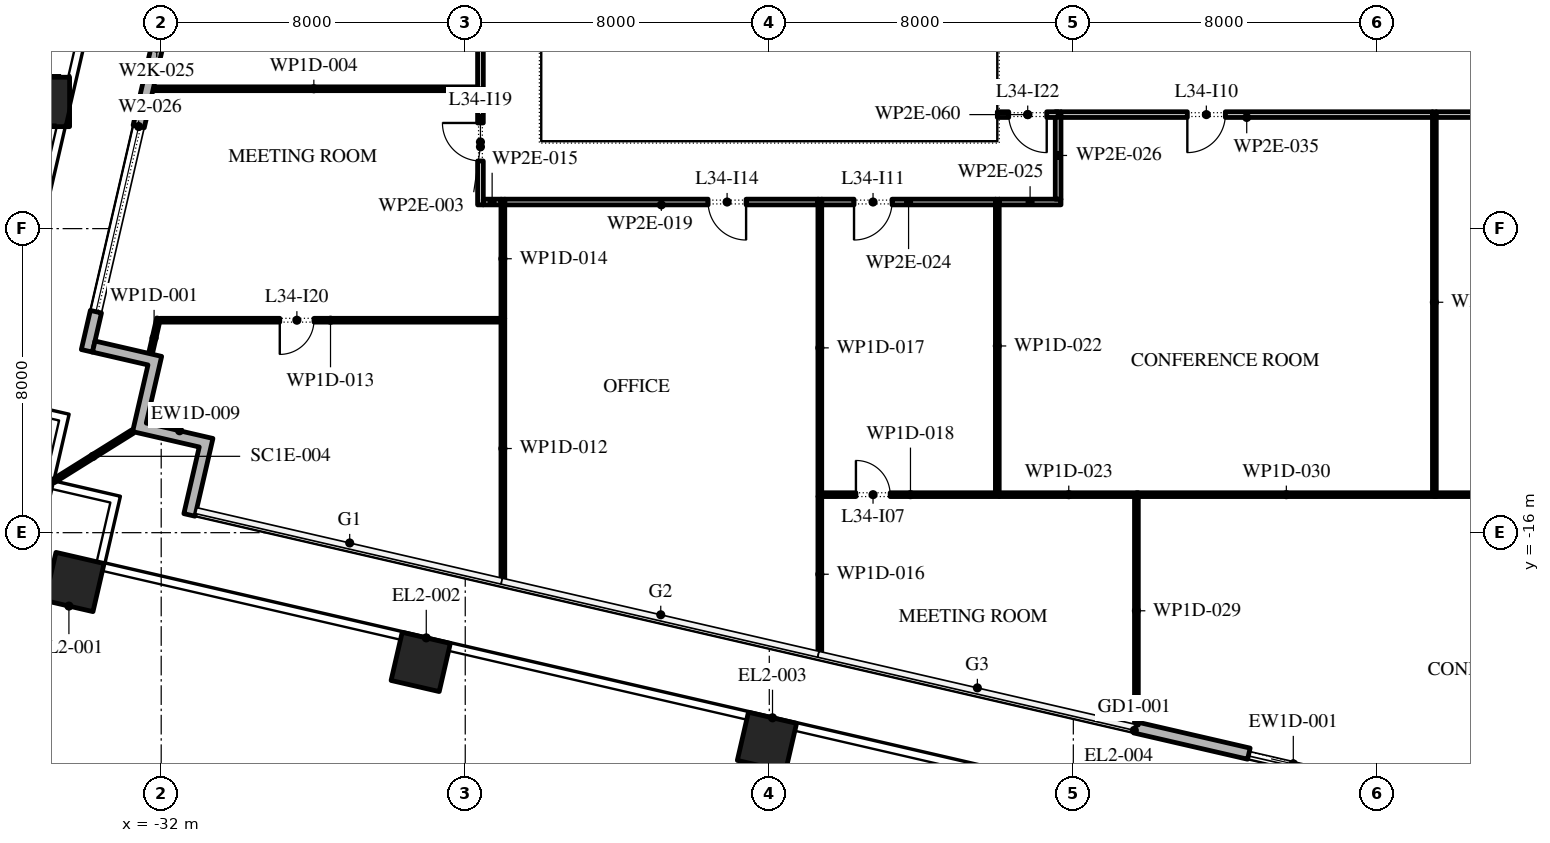
"""IFC4 building model, lengths in metres.
Left out: names, types, materials, properties, quantities, classifications, styles, units other than length and angle.
Written with IfcOpenShell. Run it as: python <this file> out.ifc"""

import sys

from ifc_helpers import new_model, si_unit, direction, frame, frame_2d, origin, origin_2d, place, context, subcontext, project, spatial, polyline, rectangle, outline, extrude, element, fill, save


model = new_model("IFC4")
c1 = context("Model", 3, precision=1e-05, world=origin(), true_north=direction((0.0, 1.0)))
c2 = subcontext(c1, "Body", "Model", "MODEL_VIEW")
j1 = project(units=[si_unit("LENGTHUNIT", "METRE"), si_unit("PLANEANGLEUNIT", "RADIAN")], contexts=[c1])
p1 = place(None, origin())
s1 = spatial("IfcSite", under=j1, at=p1, CompositionType="ELEMENT")
p2 = place(p1, origin())
s2 = spatial("IfcBuilding", under=s1, at=p2, CompositionType="ELEMENT")
p3 = place(p2, frame((0.0, 0.0, 156.0)))
s3 = spatial("IfcBuildingStorey", under=s2, at=p3, CompositionType="ELEMENT", Elevation=156.0)
for number, where, z_axis, x_axis in (
    (1, (-34.282, -17.298, 0.0), (0.0, 0.0, 1.0), (0.974, -0.225, 0.0)),
    (2, (-25.172, -19.402, 0.0), (0.0, 0.0, 1.0), (0.974, -0.225, 0.0)),
    (3, (-16.061, -21.505, 0.0), (0.0, 0.0, 1.0), (0.974, -0.225, 0.0)),
):
    element("IfcColumn", number, at=place(p3, frame(where, z_axis=z_axis, x_axis=x_axis)), inside=s3, PredefinedType="COLUMN", context=c2, shape_type="SweptSolid", body=[
        extrude(rectangle(XDim=1.3, YDim=1.3, at=origin_2d()), origin(), (0.0, 0.0, 1.0), 4.2),
    ])
p4 = place(p3, frame((-35.061, -4.667, 0.0), z_axis=(0.002906226325, 0.012613022249, 0.99991622925), x_axis=(-0.974466825284, 0.224531526563, 0.0)))
e4 = element("IfcColumn", 4, at=p4, inside=s3, PredefinedType="COLUMN", context=c2, shape_type="SweptSolid", body=[
    extrude(rectangle(XDim=1.3, YDim=1.3, at=origin_2d()), origin(), (0.0, 0.0, 1.0), 4.2),
])
p5 = place(p3, frame((-35.631, -15.139, 0.0), z_axis=(0.0, 0.0, 1.0), x_axis=(0.974370064785, -0.224951054344, 0.0)))
e5 = element("IfcColumn", 5, at=p5, inside=s3, PredefinedType="COLUMN", context=c2, shape_type="SweptSolid", body=[
    extrude(rectangle(XDim=1.3, YDim=1.3, at=origin_2d()), origin(), (0.0, 0.0, 1.0), 4.2),
])
p6 = place(p3, frame((-6.377, -21.123, 0.0), z_axis=(0.0, 0.0, 1.0), x_axis=(0.974370979495, -0.224947092265, 0.0)))
e6 = element("IfcWall", 6, at=p6, inside=s3, PredefinedType="STANDARD", context=c2, shape_type="SweptSolid", body=[
    extrude(rectangle(XDim=8.55, YDim=0.3, at=frame_2d((4.275, 0.0))), origin(), (0.0, 0.0, 1.0), 3.9),
])
p7 = place(p6, frame((3.075, 0.0, 0.0)))
e7 = element("IfcOpeningElement", 7, at=p7, cuts=e6, PredefinedType="OPENING", context=c2, shape_type="SweptSolid", body=[
    extrude(rectangle(XDim=2.4, YDim=3.5, at=frame_2d((1.2, 1.75))), frame((0.0, 0.16, 0.0), z_axis=(0.0, -1.0, 0.0), x_axis=(1.0, 0.0, 0.0)), (0.0, 0.0, 1.0), 0.32),
])
p8 = place(p3, origin())
e8 = element("IfcWall", 8, at=p8, inside=s3, PredefinedType="STANDARD", context=c2, shape_type="SweptSolid", body=[
    extrude(outline(polyline([(-32.393, -13.116), (-30.639, -13.521), (-31.111, -15.567), (-31.404, -15.5), (-30.999, -13.746), (-32.753, -13.341), (-32.348, -11.587), (-33.809, -11.25), (-33.742, -10.957), (-31.988, -11.362), (-32.393, -13.116)])), origin(), (0.0, 0.0, 1.0), 3.9),
])
p9 = place(p3, frame((-32.753, -13.341, -0.05), z_axis=(0.0, 0.0, 1.0), x_axis=(-0.848059759764, -0.529900598103, 0.0)))
e9 = element("IfcWall", 9, at=p9, inside=s3, PredefinedType="STANDARD", context=c2, shape_type="SweptSolid", body=[
    extrude(rectangle(XDim=2.455, YDim=0.1, at=frame_2d((1.228, 0.0))), origin(), (0.0, 0.0, 1.0), 3.95),
])
p10 = place(p3, frame((-32.069, -10.361, 0.0), z_axis=(0.0, 0.0, 1.0), x_axis=(-0.222987762652, -0.974821243976, 0.0)))
e10 = element("IfcWall", 10, at=p10, inside=s3, PredefinedType="PARTITIONING", context=c2, shape_type="SweptSolid", body=[
    extrude(rectangle(XDim=1.058, YDim=0.1, at=frame_2d((0.529, 0.0))), origin(), (0.0, 0.0, 1.0), 3.9),
])
p11 = place(p3, frame((-23.6, -7.375, 0.0), z_axis=(0.0, 0.0, 1.0), x_axis=(0.0, 1.0, 0.0)))
e11 = element("IfcWall", 11, at=p11, inside=s3, PredefinedType="PARTITIONING", context=c2, shape_type="SweptSolid", body=[
    extrude(rectangle(XDim=3.055, YDim=0.15, at=frame_2d((1.527, 0.0))), origin(), (0.0, 0.0, 1.0), 3.9),
])
p12 = place(p11, frame((1.155, 0.0, 0.0)))
e12 = element("IfcOpeningElement", 12, at=p12, cuts=e11, PredefinedType="OPENING", context=c2, shape_type="SweptSolid", body=[
    extrude(rectangle(XDim=1.0, YDim=2.1, at=frame_2d((0.5, 1.05))), frame((0.0, 0.085, 0.0), z_axis=(0.0, -1.0, 0.0), x_axis=(1.0, 0.0, 0.0)), (0.0, 0.0, 1.0), 0.17),
])
p13 = place(p3, frame((-23.675, -4.32, 0.0), z_axis=(0.0, 0.0, 1.0), x_axis=(-1.0, 0.0, 0.0)))
e13 = element("IfcWall", 13, at=p13, inside=s3, PredefinedType="PARTITIONING", context=c2, shape_type="SweptSolid", body=[
    extrude(rectangle(XDim=8.617, YDim=0.1, at=frame_2d((4.309, 0.0))), origin(), (0.0, 0.0, 1.0), 3.9),
])
p14 = place(p3, frame((-23.6, -4.32, 0.0), z_axis=(0.0, 0.0, 1.0), x_axis=(0.0, 1.0, 0.0)))
e14 = element("IfcWall", 14, at=p14, inside=s3, PredefinedType="PARTITIONING", context=c2, shape_type="SweptSolid", body=[
    extrude(rectangle(XDim=7.82, YDim=0.15, at=frame_2d((3.91, 0.0))), origin(), (0.0, 0.0, 1.0), 3.9),
])
p15 = place(p14, frame((3.37, 0.0, 0.0)))
e15 = element("IfcOpeningElement", 15, at=p15, cuts=e14, PredefinedType="OPENING", context=c2, shape_type="SweptSolid", body=[
    extrude(rectangle(XDim=1.0, YDim=2.1, at=frame_2d((0.5, 1.05))), frame((0.0, 0.085, 0.0), z_axis=(0.0, -1.0, 0.0), x_axis=(1.0, 0.0, 0.0)), (0.0, 0.0, 1.0), 0.17),
])
p16 = place(p3, frame((-23.01, -17.212, 0.0), z_axis=(0.0, 0.0, 1.0), x_axis=(0.0, 1.0, 0.0)))
e16 = element("IfcWall", 16, at=p16, inside=s3, PredefinedType="PARTITIONING", context=c2, shape_type="SweptSolid", body=[
    extrude(rectangle(XDim=6.852, YDim=0.1, at=frame_2d((3.426, 0.0))), origin(), (0.0, 0.0, 1.0), 3.9),
])
p17 = place(p3, frame((-23.06, -10.41, 0.0), z_axis=(0.0, 0.0, 1.0), x_axis=(-1.0, 0.0, 0.0)))
e17 = element("IfcWall", 17, at=p17, inside=s3, PredefinedType="PARTITIONING", context=c2, shape_type="SweptSolid", body=[
    extrude(rectangle(XDim=8.97, YDim=0.1, at=frame_2d((4.485, 0.0))), origin(), (0.0, 0.0, 1.0), 3.9),
])
p18 = place(p17, frame((4.92, 0.0, 0.0)))
e18 = element("IfcOpeningElement", 18, at=p18, cuts=e17, PredefinedType="OPENING", context=c2, shape_type="SweptSolid", body=[
    extrude(rectangle(XDim=0.9, YDim=2.1, at=frame_2d((0.45, 1.05))), frame((0.0, 0.06, 0.0), z_axis=(0.0, -1.0, 0.0), x_axis=(1.0, 0.0, 0.0)), (0.0, 0.0, 1.0), 0.12),
])
p19 = place(p3, frame((-23.01, -10.36, 0.0), z_axis=(0.0, 0.0, 1.0), x_axis=(0.0, 1.0, 0.0)))
e19 = element("IfcWall", 19, at=p19, inside=s3, PredefinedType="PARTITIONING", context=c2, shape_type="SweptSolid", body=[
    extrude(rectangle(XDim=3.135, YDim=0.1, at=frame_2d((1.567, 0.0))), origin(), (0.0, 0.0, 1.0), 3.9),
])
p20 = place(p3, frame((-23.06, -7.3, 0.0), z_axis=(0.0, 0.0, 1.0), x_axis=(-1.0, 0.0, 0.0)))
e20 = element("IfcWall", 20, at=p20, inside=s3, PredefinedType="PARTITIONING", context=c2, shape_type="SweptSolid", body=[
    extrude(rectangle(XDim=0.465, YDim=0.15, at=frame_2d((0.232, 0.0))), origin(), (0.0, 0.0, 1.0), 3.9),
])
p21 = place(p3, frame((-14.67, -19.138, 0.0), z_axis=(0.0, 0.0, 1.0), x_axis=(0.0, 1.0, 0.0)))
e21 = element("IfcWall", 21, at=p21, inside=s3, PredefinedType="PARTITIONING", context=c2, shape_type="SweptSolid", body=[
    extrude(rectangle(XDim=4.088, YDim=0.1, at=frame_2d((2.044, 0.0))), origin(), (0.0, 0.0, 1.0), 3.9),
])
p22 = place(p3, frame((-14.67, -15.05, 0.0), z_axis=(0.0, 0.0, 1.0), x_axis=(0.0, 1.0, 0.0)))
e22 = element("IfcWall", 22, at=p22, inside=s3, PredefinedType="PARTITIONING", context=c2, shape_type="SweptSolid", body=[
    extrude(rectangle(XDim=7.825, YDim=0.1, at=frame_2d((3.913, 0.0))), origin(), (0.0, 0.0, 1.0), 3.9),
])
p23 = place(p3, frame((-14.62, -15.0, 0.0), z_axis=(0.0, 0.0, 1.0), x_axis=(1.0, 0.0, 0.0)))
e23 = element("IfcWall", 23, at=p23, inside=s3, PredefinedType="PARTITIONING", context=c2, shape_type="SweptSolid", body=[
    extrude(rectangle(XDim=4.67, YDim=0.1, at=frame_2d((2.335, 0.0))), origin(), (0.0, 0.0, 1.0), 3.9),
])
p24 = place(p23, frame((0.9, 0.0, 0.0)))
e24 = element("IfcOpeningElement", 24, at=p24, cuts=e23, PredefinedType="OPENING", context=c2, shape_type="SweptSolid", body=[
    extrude(rectangle(XDim=0.9, YDim=2.1, at=frame_2d((0.45, 1.05))), frame((0.0, 0.06, 0.0), z_axis=(0.0, -1.0, 0.0), x_axis=(1.0, 0.0, 0.0)), (0.0, 0.0, 1.0), 0.12),
])
p25 = place(p3, frame((-14.72, -7.3, 0.0), z_axis=(0.0, 0.0, 1.0), x_axis=(-1.0, 0.0, 0.0)))
e25 = element("IfcWall", 25, at=p25, inside=s3, PredefinedType="PARTITIONING", context=c2, shape_type="SweptSolid", body=[
    extrude(rectangle(XDim=8.24, YDim=0.15, at=frame_2d((4.12, 0.0))), origin(), (0.0, 0.0, 1.0), 3.9),
])
p26 = place(p25, frame((1.89, 0.0, 0.0)))
e26 = element("IfcOpeningElement", 26, at=p26, cuts=e25, PredefinedType="OPENING", context=c2, shape_type="SweptSolid", body=[
    extrude(rectangle(XDim=1.0, YDim=2.1, at=frame_2d((0.5, 1.05))), frame((0.0, 0.085, 0.0), z_axis=(0.0, -1.0, 0.0), x_axis=(1.0, 0.0, 0.0)), (0.0, 0.0, 1.0), 0.17),
])
p27 = place(p3, frame((-10.0, -14.95, 0.0), z_axis=(0.0, 0.0, 1.0), x_axis=(0.0, 1.0, 0.0)))
e27 = element("IfcWall", 27, at=p27, inside=s3, PredefinedType="PARTITIONING", context=c2, shape_type="SweptSolid", body=[
    extrude(rectangle(XDim=7.725, YDim=0.1, at=frame_2d((3.862, 0.0))), origin(), (0.0, 0.0, 1.0), 3.9),
])
p28 = place(p3, frame((-9.95, -15.0, 0.0), z_axis=(0.0, 0.0, 1.0), x_axis=(1.0, 0.0, 0.0)))
e28 = element("IfcWall", 28, at=p28, inside=s3, PredefinedType="PARTITIONING", context=c2, shape_type="SweptSolid", body=[
    extrude(rectangle(XDim=3.66, YDim=0.1, at=frame_2d((1.83, 0.0))), origin(), (0.0, 0.0, 1.0), 3.9),
])
p29 = place(p3, frame((-10.05, -7.3, 0.0), z_axis=(0.0, 0.0, 1.0), x_axis=(-1.0, 0.0, 0.0)))
e29 = element("IfcWall", 29, at=p29, inside=s3, PredefinedType="PARTITIONING", context=c2, shape_type="SweptSolid", body=[
    extrude(rectangle(XDim=4.57, YDim=0.15, at=frame_2d((2.285, 0.0))), origin(), (0.0, 0.0, 1.0), 3.9),
])
p30 = place(p29, frame((2.72, 0.0, 0.0)))
e30 = element("IfcOpeningElement", 30, at=p30, cuts=e29, PredefinedType="OPENING", context=c2, shape_type="SweptSolid", body=[
    extrude(rectangle(XDim=1.0, YDim=2.1, at=frame_2d((0.5, 1.05))), frame((0.0, 0.085, 0.0), z_axis=(0.0, -1.0, 0.0), x_axis=(1.0, 0.0, 0.0)), (0.0, 0.0, 1.0), 0.17),
])
p31 = place(p3, frame((-8.325, -7.3, 0.0), z_axis=(0.0, 0.0, 1.0), x_axis=(-1.0, 0.0, 0.0)))
e31 = element("IfcWall", 31, at=p31, inside=s3, PredefinedType="PARTITIONING", context=c2, shape_type="SweptSolid", body=[
    extrude(rectangle(XDim=1.625, YDim=0.15, at=frame_2d((0.812, 0.0))), origin(), (0.0, 0.0, 1.0), 3.9),
])
p32 = place(p3, frame((-8.4, -4.925, 0.0), z_axis=(0.0, 0.0, 1.0), x_axis=(0.0, -1.0, 0.0)))
e32 = element("IfcWall", 32, at=p32, inside=s3, PredefinedType="PARTITIONING", context=c2, shape_type="SweptSolid", body=[
    extrude(rectangle(XDim=2.3, YDim=0.15, at=frame_2d((1.15, 0.0))), origin(), (0.0, 0.0, 1.0), 3.9),
])
p33 = place(p3, frame((-6.34, -15.05, 0.0), z_axis=(0.0, 0.0, 1.0), x_axis=(0.0, -1.0, 0.0)))
e33 = element("IfcWall", 33, at=p33, inside=s3, PredefinedType="PARTITIONING", context=c2, shape_type="SweptSolid", body=[
    extrude(rectangle(XDim=6.011, YDim=0.1, at=frame_2d((3.005, 0.0))), origin(), (0.0, 0.0, 1.0), 3.9),
])
p34 = place(p3, frame((-6.34, -15.0, 0.0), z_axis=(0.0, 0.0, 1.0), x_axis=(1.0, 0.0, 0.0)))
e34 = element("IfcWall", 34, at=p34, inside=s3, PredefinedType="PARTITIONING", context=c2, shape_type="SweptSolid", body=[
    extrude(rectangle(XDim=7.89, YDim=0.1, at=frame_2d((3.945, 0.0))), origin(), (0.0, 0.0, 1.0), 3.9),
])
p35 = place(p3, frame((1.5, -14.95, 0.0), z_axis=(0.0, 0.0, 1.0), x_axis=(0.0, 1.0, 0.0)))
e35 = element("IfcWall", 35, at=p35, inside=s3, PredefinedType="PARTITIONING", context=c2, shape_type="SweptSolid", body=[
    extrude(rectangle(XDim=10.025, YDim=0.1, at=frame_2d((5.012, 0.0))), origin(), (0.0, 0.0, 1.0), 3.9),
])
p36 = place(p3, frame((1.5, -15.0, 0.0), z_axis=(0.0, 0.0, 1.0), x_axis=(1.0, 0.0, 0.0)))
e36 = element("IfcWall", 36, at=p36, inside=s3, PredefinedType="PARTITIONING", context=c2, shape_type="SweptSolid", body=[
    extrude(rectangle(XDim=8.87, YDim=0.1, at=frame_2d((4.435, 0.0))), origin(), (0.0, 0.0, 1.0), 3.9),
])
p37 = place(p36, frame((4.95, 0.0, 0.0)))
e37 = element("IfcOpeningElement", 37, at=p37, cuts=e36, PredefinedType="OPENING", context=c2, shape_type="SweptSolid", body=[
    extrude(rectangle(XDim=0.9, YDim=2.1, at=frame_2d((0.45, 1.05))), frame((0.0, 0.06, 0.0), z_axis=(0.0, -1.0, 0.0), x_axis=(1.0, 0.0, 0.0)), (0.0, 0.0, 1.0), 0.12),
])
p38 = place(p3, frame((1.45, -5.0, 0.0), z_axis=(0.0, 0.0, 1.0), x_axis=(-1.0, 0.0, 0.0)))
e38 = element("IfcWall", 38, at=p38, inside=s3, PredefinedType="PARTITIONING", context=c2, shape_type="SweptSolid", body=[
    extrude(rectangle(XDim=9.775, YDim=0.15, at=frame_2d((4.887, 0.0))), origin(), (0.0, 0.0, 1.0), 3.9),
])
p39 = place(p38, frame((5.45, 0.0, 0.0)))
e39 = element("IfcOpeningElement", 39, at=p39, cuts=e38, PredefinedType="OPENING", context=c2, shape_type="SweptSolid", body=[
    extrude(rectangle(XDim=1.0, YDim=2.1, at=frame_2d((0.5, 1.05))), frame((0.0, 0.085, 0.0), z_axis=(0.0, -1.0, 0.0), x_axis=(1.0, 0.0, 0.0)), (0.0, 0.0, 1.0), 0.17),
])
p40 = place(p3, frame((8.325, -5.0, 0.0), z_axis=(0.0, 0.0, 1.0), x_axis=(-1.0, 0.0, 0.0)))
e40 = element("IfcWall", 40, at=p40, inside=s3, PredefinedType="PARTITIONING", context=c2, shape_type="SweptSolid", body=[
    extrude(rectangle(XDim=6.775, YDim=0.15, at=frame_2d((3.387, 0.0))), origin(), (0.0, 0.0, 1.0), 3.9),
])
p41 = place(p40, frame((4.175, 0.0, 0.0)))
e41 = element("IfcOpeningElement", 41, at=p41, cuts=e40, PredefinedType="OPENING", context=c2, shape_type="SweptSolid", body=[
    extrude(rectangle(XDim=1.0, YDim=2.1, at=frame_2d((0.5, 1.05))), frame((0.0, 0.085, 0.0), z_axis=(0.0, -1.0, 0.0), x_axis=(1.0, 0.0, 0.0)), (0.0, 0.0, 1.0), 0.17),
])
p42 = place(p3, frame((-8.4, -5.0, 0.0), z_axis=(0.0, 0.0, 1.0), x_axis=(-1.0, 0.0, 0.0)))
e42 = element("IfcWall", 42, at=p42, inside=s3, PredefinedType="PARTITIONING", context=c2, shape_type="SweptSolid", body=[
    extrude(rectangle(XDim=1.6, YDim=0.15, at=frame_2d((0.8, 0.0))), origin(), (0.0, 0.0, 1.0), 3.9),
])
p43 = place(p42, frame((0.3, 0.0, 0.0)))
e43 = element("IfcOpeningElement", 43, at=p43, cuts=e42, PredefinedType="OPENING", context=c2, shape_type="SweptSolid", body=[
    extrude(rectangle(XDim=1.0, YDim=2.1, at=frame_2d((0.5, 1.05))), frame((0.0, 0.085, 0.0), z_axis=(0.0, -1.0, 0.0), x_axis=(1.0, 0.0, 0.0)), (0.0, 0.0, 1.0), 0.17),
])
p44 = place(p3, frame((-22.983, 36.311, 0.0), z_axis=(0.0, 0.0, 1.0), x_axis=(-0.224952722155, -0.974369679739, 0.0)))
e44 = element("IfcWall", 44, at=p44, inside=s3, PredefinedType="STANDARD", context=c2, shape_type="SweptSolid", body=[
    extrude(rectangle(XDim=48.777, YDim=0.3, at=frame_2d((24.388, 0.0))), origin(), (0.0, 0.0, 1.0), 3.9),
])
p45 = place(p44, frame((0.184, 0.0, 0.45)))
e45 = element("IfcOpeningElement", 45, at=p45, cuts=e44, PredefinedType="OPENING", context=c2, shape_type="SweptSolid", body=[
    extrude(rectangle(XDim=5.0, YDim=3.25, at=frame_2d((2.5, 1.625))), frame((0.0, 0.16, 0.0), z_axis=(0.0, -1.0, 0.0), x_axis=(1.0, 0.0, 0.0)), (0.0, 0.0, 1.0), 0.32),
])
p46 = place(p44, frame((7.148, 0.0, 0.45)))
e46 = element("IfcOpeningElement", 46, at=p46, cuts=e44, PredefinedType="OPENING", context=c2, shape_type="SweptSolid", body=[
    extrude(rectangle(XDim=5.0, YDim=2.95, at=frame_2d((2.5, 1.475))), frame((0.0, 0.16, 0.0), z_axis=(0.0, -1.0, 0.0), x_axis=(1.0, 0.0, 0.0)), (0.0, 0.0, 1.0), 0.32),
])
p47 = place(p44, frame((14.262, 0.0, 0.45)))
e47 = element("IfcOpeningElement", 47, at=p47, cuts=e44, PredefinedType="OPENING", context=c2, shape_type="SweptSolid", body=[
    extrude(rectangle(XDim=5.0, YDim=2.95, at=frame_2d((2.5, 1.475))), frame((0.0, 0.16, 0.0), z_axis=(0.0, -1.0, 0.0), x_axis=(1.0, 0.0, 0.0)), (0.0, 0.0, 1.0), 0.32),
])
p48 = place(p44, frame((22.677, 0.0, 0.0)))
e48 = element("IfcOpeningElement", 48, at=p48, cuts=e44, PredefinedType="OPENING", context=c2, shape_type="SweptSolid", body=[
    extrude(rectangle(XDim=2.4, YDim=3.5, at=frame_2d((1.2, 1.75))), frame((0.0, 0.16, 0.0), z_axis=(0.0, -1.0, 0.0), x_axis=(1.0, 0.0, 0.0)), (0.0, 0.0, 1.0), 0.32),
])
p49 = place(p44, frame((28.491, 0.0, 0.45)))
e49 = element("IfcOpeningElement", 49, at=p49, cuts=e44, PredefinedType="OPENING", context=c2, shape_type="SweptSolid", body=[
    extrude(rectangle(XDim=5.0, YDim=2.775, at=frame_2d((2.5, 1.387))), frame((0.0, 0.16, 0.0), z_axis=(0.0, -1.0, 0.0), x_axis=(1.0, 0.0, 0.0)), (0.0, 0.0, 1.0), 0.32),
])
p50 = place(p44, frame((35.605, 0.0, 0.45)))
e50 = element("IfcOpeningElement", 50, at=p50, cuts=e44, PredefinedType="OPENING", context=c2, shape_type="SweptSolid", body=[
    extrude(rectangle(XDim=5.0, YDim=2.575, at=frame_2d((2.5, 1.288))), frame((0.0, 0.16, 0.0), z_axis=(0.0, -1.0, 0.0), x_axis=(1.0, 0.0, 0.0)), (0.0, 0.0, 1.0), 0.32),
])
p51 = place(p44, frame((42.719, 0.0, 0.45)))
e51 = element("IfcOpeningElement", 51, at=p51, cuts=e44, PredefinedType="OPENING", context=c2, shape_type="SweptSolid", body=[
    extrude(rectangle(XDim=5.0, YDim=3.25, at=frame_2d((2.5, 1.625))), frame((0.0, 0.16, 0.0), z_axis=(0.0, -1.0, 0.0), x_axis=(1.0, 0.0, 0.0)), (0.0, 0.0, 1.0), 0.32),
])
p52 = place(p7, origin())
e52 = element("IfcDoor", 52, at=p52, inside=s3, OperationType="DOUBLE_DOOR_SLIDING", PredefinedType="DOOR", context=c2, shape_type="SweptSolid", body=[
    extrude(rectangle(XDim=2.4, YDim=3.5, at=frame_2d((1.2, 1.75))), frame((0.0, 0.025, 0.0), z_axis=(0.0, -1.0, 0.0), x_axis=(1.0, 0.0, 0.0)), (0.0, 0.0, 1.0), 0.05),
])
fill(e7, e52)
p53 = place(p51, origin())
e53 = element("IfcWindow", 53, at=p53, inside=s3, PartitioningType="DOUBLE_PANEL_VERTICAL", PredefinedType="WINDOW", context=c2, shape_type="SweptSolid", body=[
    extrude(rectangle(XDim=5.0, YDim=3.25, at=frame_2d((2.5, 1.625))), frame((0.0, 0.03, 0.0), z_axis=(0.0, -1.0, 0.0), x_axis=(1.0, 0.0, 0.0)), (0.0, 0.0, 1.0), 0.06),
])
fill(e51, e53)
p54 = place(p24, origin())
e54 = element("IfcDoor", 54, at=p54, inside=s3, OperationType="SINGLE_SWING_RIGHT", PredefinedType="DOOR", context=c2, shape_type="SweptSolid", body=[
    extrude(rectangle(XDim=0.9, YDim=2.1, at=frame_2d((0.45, 1.05))), frame((0.0, 0.025, 0.0), z_axis=(0.0, -1.0, 0.0), x_axis=(1.0, 0.0, 0.0)), (0.0, 0.0, 1.0), 0.05),
])
fill(e24, e54)
p55 = place(p39, origin())
e55 = element("IfcDoor", 55, at=p55, inside=s3, OperationType="SINGLE_SWING_LEFT", PredefinedType="DOOR", context=c2, shape_type="SweptSolid", body=[
    extrude(rectangle(XDim=1.0, YDim=2.1, at=frame_2d((0.5, 1.05))), frame((0.0, 0.025, 0.0), z_axis=(0.0, -1.0, 0.0), x_axis=(1.0, 0.0, 0.0)), (0.0, 0.0, 1.0), 0.05),
])
fill(e39, e55)
p56 = place(p30, origin())
e56 = element("IfcDoor", 56, at=p56, inside=s3, OperationType="SINGLE_SWING_LEFT", PredefinedType="DOOR", context=c2, shape_type="SweptSolid", body=[
    extrude(rectangle(XDim=1.0, YDim=2.1, at=frame_2d((0.5, 1.05))), frame((0.0, 0.025, 0.0), z_axis=(0.0, -1.0, 0.0), x_axis=(1.0, 0.0, 0.0)), (0.0, 0.0, 1.0), 0.05),
])
fill(e30, e56)
p57 = place(p26, origin())
e57 = element("IfcDoor", 57, at=p57, inside=s3, OperationType="SINGLE_SWING_RIGHT", PredefinedType="DOOR", context=c2, shape_type="SweptSolid", body=[
    extrude(rectangle(XDim=1.0, YDim=2.1, at=frame_2d((0.5, 1.05))), frame((0.0, 0.025, 0.0), z_axis=(0.0, -1.0, 0.0), x_axis=(1.0, 0.0, 0.0)), (0.0, 0.0, 1.0), 0.05),
])
fill(e26, e57)
p58 = place(p12, origin())
e58 = element("IfcDoor", 58, at=p58, inside=s3, OperationType="SINGLE_SWING_LEFT", PredefinedType="DOOR", context=c2, shape_type="SweptSolid", body=[
    extrude(rectangle(XDim=1.0, YDim=2.1, at=frame_2d((0.5, 1.05))), frame((0.0, 0.025, 0.0), z_axis=(0.0, -1.0, 0.0), x_axis=(1.0, 0.0, 0.0)), (0.0, 0.0, 1.0), 0.05),
])
fill(e12, e58)
p59 = place(p18, origin())
e59 = element("IfcDoor", 59, at=p59, inside=s3, OperationType="SINGLE_SWING_LEFT", PredefinedType="DOOR", context=c2, shape_type="SweptSolid", body=[
    extrude(rectangle(XDim=0.9, YDim=2.1, at=frame_2d((0.45, 1.05))), frame((0.0, 0.025, 0.0), z_axis=(0.0, -1.0, 0.0), x_axis=(1.0, 0.0, 0.0)), (0.0, 0.0, 1.0), 0.05),
])
fill(e18, e59)
p60 = place(p43, origin())
e60 = element("IfcDoor", 60, at=p60, inside=s3, OperationType="SINGLE_SWING_RIGHT", PredefinedType="DOOR", context=c2, shape_type="SweptSolid", body=[
    extrude(rectangle(XDim=1.0, YDim=2.1, at=frame_2d((0.5, 1.05))), frame((0.0, 0.025, 0.0), z_axis=(0.0, -1.0, 0.0), x_axis=(1.0, 0.0, 0.0)), (0.0, 0.0, 1.0), 0.05),
])
fill(e43, e60)
save(model, sys.argv[1])
